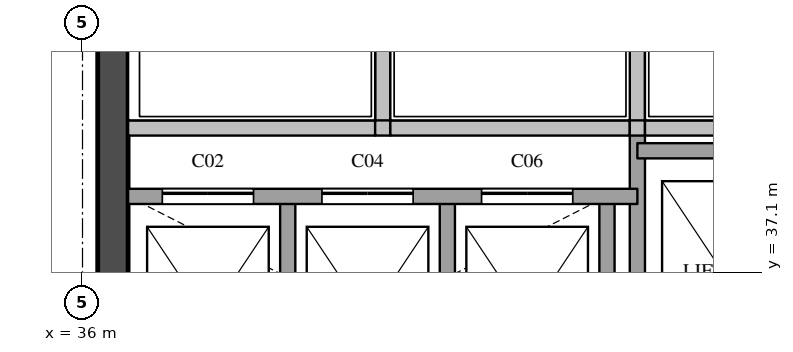
"""IFC4 building model, lengths in metres.
Left out: names, types, materials, properties, quantities, classifications, styles, units other than length and angle.
Written with IfcOpenShell. Run it as: python <this file> out.ifc"""

import sys

from ifc_helpers import new_model, si_unit, direction, frame, frame_2d, origin, place, context, subcontext, project, spatial, rectangle, extrude, element, fill, save


model = new_model("IFC4")
c1 = context("Model", 3, precision=1e-05, world=origin(), true_north=direction((0.0, 1.0)))
c2 = subcontext(c1, "Body", "Model", "MODEL_VIEW")
j1 = project(units=[si_unit("LENGTHUNIT", "METRE"), si_unit("PLANEANGLEUNIT", "RADIAN")], contexts=[c1])
p1 = place(None, origin())
s1 = spatial("IfcSite", under=j1, at=p1, CompositionType="ELEMENT")
p2 = place(p1, origin())
s2 = spatial("IfcBuilding", under=s1, at=p2, CompositionType="ELEMENT")
p3 = place(p2, frame((0.0, 0.0, 246.2)))
s3 = spatial("IfcBuildingStorey", under=s2, at=p3, CompositionType="ELEMENT", Elevation=246.2)
p4 = place(p3, frame((36.4, 29.1, 0.0), z_axis=(0.0, 0.0, 1.0), x_axis=(0.0, 1.0, 0.0)))
e1 = element("IfcWall", 1, at=p4, inside=s3, PredefinedType="SHEAR", context=c2, shape_type="SweptSolid", body=[
    extrude(rectangle(XDim=20.3, YDim=0.4, at=frame_2d((10.15, 0.0))), origin(), (0.0, 0.0, 1.0), 3.6),
])
p5 = place(p4, frame((3.6, 0.0, 0.0)))
e2 = element("IfcOpeningElement", 2, at=p5, cuts=e1, PredefinedType="OPENING", context=c2, shape_type="SweptSolid", body=[
    extrude(rectangle(XDim=1.8, YDim=2.1, at=frame_2d((0.9, 1.05))), frame((0.0, 0.21, 0.0), z_axis=(0.0, -1.0, 0.0), x_axis=(1.0, 0.0, 0.0)), (0.0, 0.0, 1.0), 0.42),
])
p6 = place(p4, frame((16.4, 0.0, 0.0)))
e3 = element("IfcOpeningElement", 3, at=p6, cuts=e1, PredefinedType="OPENING", context=c2, shape_type="SweptSolid", body=[
    extrude(rectangle(XDim=1.0, YDim=2.1, at=frame_2d((0.5, 1.05))), frame((0.0, 0.21, 0.0), z_axis=(0.0, -1.0, 0.0), x_axis=(1.0, 0.0, 0.0)), (0.0, 0.0, 1.0), 0.42),
])
p7 = place(p3, frame((38.7, 34.9, 0.0), z_axis=(0.0, 0.0, 1.0), x_axis=(0.0, 1.0, 0.0)))
e4 = element("IfcWall", 4, at=p7, inside=s3, PredefinedType="SOLIDWALL", context=c2, shape_type="SweptSolid", body=[
    extrude(rectangle(XDim=3.2, YDim=0.2, at=frame_2d((1.6, 0.0))), origin(), (0.0, 0.0, 1.0), 3.6),
])
p8 = place(p3, frame((39.95, 39.0, 0.0), z_axis=(0.0, 0.0, 1.0), x_axis=(0.0, 1.0, 0.0)))
e5 = element("IfcWall", 5, at=p8, inside=s3, PredefinedType="SOLIDWALL", context=c2, shape_type="SweptSolid", body=[
    extrude(rectangle(XDim=1.78, YDim=0.2, at=frame_2d((0.89, 0.0))), origin(), (0.0, 0.0, 1.0), 3.6),
])
for number, where, z_axis, x_axis in (
    (6, (40.8, 34.9, 0.0), (0.0, 0.0, 1.0), (0.0, 1.0, 0.0)),
    (7, (42.9, 34.9, 0.0), (0.0, 0.0, 1.0), (0.0, 1.0, 0.0)),
):
    element("IfcWall", number, at=place(p3, frame(where, z_axis=z_axis, x_axis=x_axis)), inside=s3, PredefinedType="SOLIDWALL", context=c2, shape_type="SweptSolid", body=[
        extrude(rectangle(XDim=3.2, YDim=0.2, at=frame_2d((1.6, 0.0))), origin(), (0.0, 0.0, 1.0), 3.6),
    ])
p9 = place(p3, frame((43.3, 29.1, 0.0), z_axis=(0.0, 0.0, 1.0), x_axis=(0.0, 1.0, 0.0)))
e8 = element("IfcWall", 8, at=p9, inside=s3, PredefinedType="SOLIDWALL", context=c2, shape_type="SweptSolid", body=[
    extrude(rectangle(XDim=9.9, YDim=0.2, at=frame_2d((4.95, 0.0))), origin(), (0.0, 0.0, 1.0), 3.6),
])
p10 = place(p3, frame((43.3, 39.0, 0.0), z_axis=(0.0, 0.0, 1.0), x_axis=(0.0, 1.0, 0.0)))
e9 = element("IfcWall", 9, at=p10, inside=s3, PredefinedType="SOLIDWALL", context=c2, shape_type="SweptSolid", body=[
    extrude(rectangle(XDim=1.78, YDim=0.2, at=frame_2d((0.89, 0.0))), origin(), (0.0, 0.0, 1.0), 3.6),
])
p11 = place(p3, frame((36.6, 38.1, 0.0), z_axis=(0.0, 0.0, 1.0), x_axis=(1.0, 0.0, 0.0)))
e10 = element("IfcWall", 10, at=p11, inside=s3, PredefinedType="SOLIDWALL", context=c2, shape_type="SweptSolid", body=[
    extrude(rectangle(XDim=6.7, YDim=0.2, at=frame_2d((3.35, 0.0))), origin(), (0.0, 0.0, 1.0), 3.6),
])
p12 = place(p11, frame((0.45, 0.0, 0.0)))
e11 = element("IfcOpeningElement", 11, at=p12, cuts=e10, PredefinedType="OPENING", context=c2, shape_type="SweptSolid", body=[
    extrude(rectangle(XDim=1.2, YDim=2.1, at=frame_2d((0.6, 1.05))), frame((0.0, 0.11, 0.0), z_axis=(0.0, -1.0, 0.0), x_axis=(1.0, 0.0, 0.0)), (0.0, 0.0, 1.0), 0.22),
])
p13 = place(p11, frame((2.55, 0.0, 0.0)))
e12 = element("IfcOpeningElement", 12, at=p13, cuts=e10, PredefinedType="OPENING", context=c2, shape_type="SweptSolid", body=[
    extrude(rectangle(XDim=1.2, YDim=2.1, at=frame_2d((0.6, 1.05))), frame((0.0, 0.11, 0.0), z_axis=(0.0, -1.0, 0.0), x_axis=(1.0, 0.0, 0.0)), (0.0, 0.0, 1.0), 0.22),
])
p14 = place(p11, frame((4.65, 0.0, 0.0)))
e13 = element("IfcOpeningElement", 13, at=p14, cuts=e10, PredefinedType="OPENING", context=c2, shape_type="SweptSolid", body=[
    extrude(rectangle(XDim=1.2, YDim=2.1, at=frame_2d((0.6, 1.05))), frame((0.0, 0.11, 0.0), z_axis=(0.0, -1.0, 0.0), x_axis=(1.0, 0.0, 0.0)), (0.0, 0.0, 1.0), 0.22),
])
p15 = place(p3, frame((43.3, 38.7, 0.0), z_axis=(0.0, 0.0, 1.0), x_axis=(1.0, 0.0, 0.0)))
e14 = element("IfcWall", 14, at=p15, inside=s3, PredefinedType="SOLIDWALL", context=c2, shape_type="SweptSolid", body=[
    extrude(rectangle(XDim=4.5, YDim=0.2, at=frame_2d((2.25, 0.0))), origin(), (0.0, 0.0, 1.0), 3.6),
])
p16 = place(p3, frame((36.6, 39.0, 0.0), z_axis=(0.0, 0.0, 1.0), x_axis=(1.0, 0.0, 0.0)))
e15 = element("IfcWall", 15, at=p16, inside=s3, PredefinedType="SOLIDWALL", context=c2, shape_type="SweptSolid", body=[
    extrude(rectangle(XDim=3.25, YDim=0.2, at=frame_2d((1.625, 0.0))), origin(), (0.0, 0.0, 1.0), 3.6),
])
p17 = place(p3, frame((39.85, 39.0, 0.0), z_axis=(0.0, 0.0, 1.0), x_axis=(1.0, 0.0, 0.0)))
e16 = element("IfcWall", 16, at=p17, inside=s3, PredefinedType="SOLIDWALL", context=c2, shape_type="SweptSolid", body=[
    extrude(rectangle(XDim=0.2, YDim=0.2, at=frame_2d((0.1, 0.0))), origin(), (0.0, 0.0, 1.0), 3.6),
])
p18 = place(p3, frame((40.05, 39.0, 0.0), z_axis=(0.0, 0.0, 1.0), x_axis=(1.0, 0.0, 0.0)))
e17 = element("IfcWall", 17, at=p18, inside=s3, PredefinedType="SOLIDWALL", context=c2, shape_type="SweptSolid", body=[
    extrude(rectangle(XDim=3.15, YDim=0.2, at=frame_2d((1.575, 0.0))), origin(), (0.0, 0.0, 1.0), 3.6),
])
p19 = place(p3, frame((43.2, 39.0, 0.0), z_axis=(0.0, 0.0, 1.0), x_axis=(1.0, 0.0, 0.0)))
e18 = element("IfcWall", 18, at=p19, inside=s3, PredefinedType="SOLIDWALL", context=c2, shape_type="SweptSolid", body=[
    extrude(rectangle(XDim=0.2, YDim=0.2, at=frame_2d((0.1, 0.0))), origin(), (0.0, 0.0, 1.0), 3.6),
])
p20 = place(p3, frame((43.4, 39.0, 0.0), z_axis=(0.0, 0.0, 1.0), x_axis=(1.0, 0.0, 0.0)))
e19 = element("IfcWall", 19, at=p20, inside=s3, PredefinedType="SOLIDWALL", context=c2, shape_type="SweptSolid", body=[
    extrude(rectangle(XDim=3.25, YDim=0.2, at=frame_2d((1.625, 0.0))), origin(), (0.0, 0.0, 1.0), 3.6),
])
p21 = place(p12, origin())
e20 = element("IfcDoor", 20, at=p21, inside=s3, OperationType="SLIDING_TO_LEFT", PredefinedType="DOOR", context=c2, shape_type="SweptSolid", body=[
    extrude(rectangle(XDim=1.2, YDim=2.1, at=frame_2d((0.6, 1.05))), frame((0.0, 0.025, 0.0), z_axis=(0.0, -1.0, 0.0), x_axis=(1.0, 0.0, 0.0)), (0.0, 0.0, 1.0), 0.05),
])
fill(e11, e20)
p22 = place(p13, origin())
e21 = element("IfcDoor", 21, at=p22, inside=s3, OperationType="SLIDING_TO_LEFT", PredefinedType="DOOR", context=c2, shape_type="SweptSolid", body=[
    extrude(rectangle(XDim=1.2, YDim=2.1, at=frame_2d((0.6, 1.05))), frame((0.0, 0.025, 0.0), z_axis=(0.0, -1.0, 0.0), x_axis=(1.0, 0.0, 0.0)), (0.0, 0.0, 1.0), 0.05),
])
fill(e12, e21)
p23 = place(p14, origin())
e22 = element("IfcDoor", 22, at=p23, inside=s3, OperationType="SLIDING_TO_LEFT", PredefinedType="DOOR", context=c2, shape_type="SweptSolid", body=[
    extrude(rectangle(XDim=1.2, YDim=2.1, at=frame_2d((0.6, 1.05))), frame((0.0, 0.025, 0.0), z_axis=(0.0, -1.0, 0.0), x_axis=(1.0, 0.0, 0.0)), (0.0, 0.0, 1.0), 0.05),
])
fill(e13, e22)
save(model, sys.argv[1])
